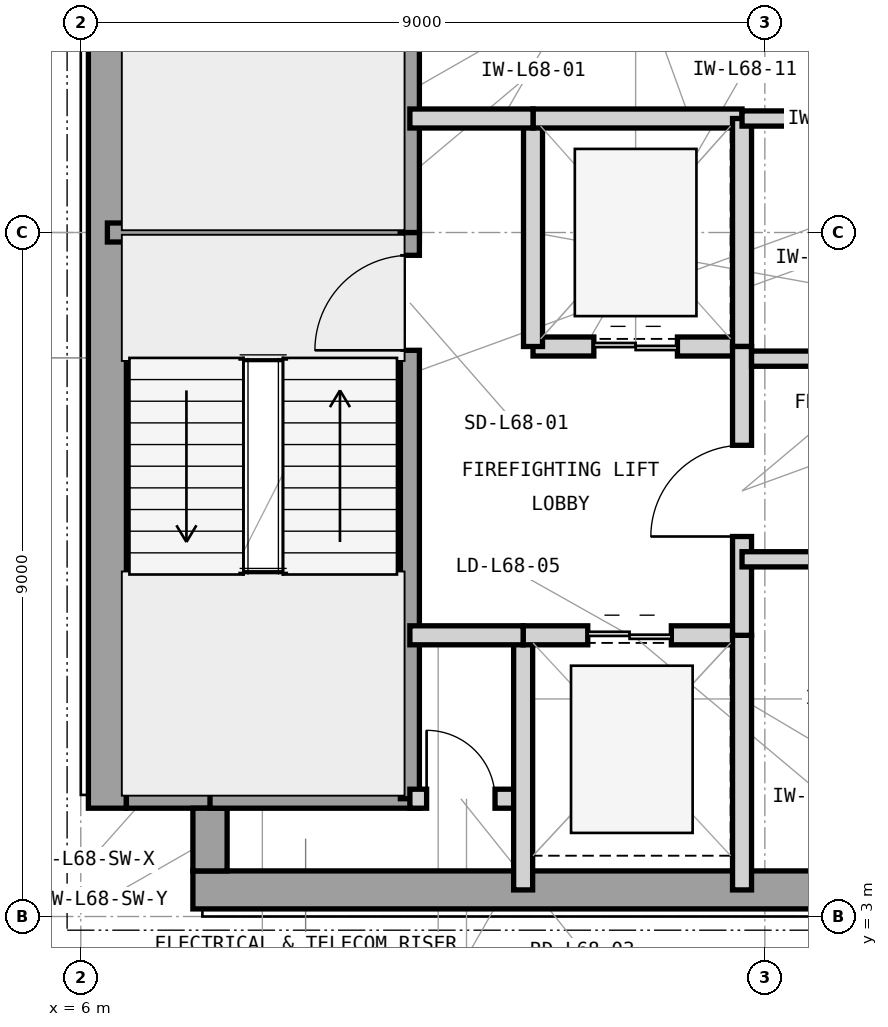
"""IFC4 building model, lengths in metres.
Left out: names, types, materials, properties, quantities, classifications, styles, units other than length and angle.
Written with IfcOpenShell. Run it as: python <this file> out.ifc"""

import sys

from ifc_helpers import new_model, si_unit, direction, frame, frame_2d, origin, place, context, subcontext, project, spatial, rectangle, extrude, element, fill, save


model = new_model("IFC4")
c1 = context("Model", 3, precision=1e-05, world=origin(), true_north=direction((0.0, 1.0)))
c2 = subcontext(c1, "Body", "Model", "MODEL_VIEW")
j1 = project(units=[si_unit("LENGTHUNIT", "METRE"), si_unit("PLANEANGLEUNIT", "RADIAN")], contexts=[c1])
p1 = place(None, origin())
s1 = spatial("IfcSite", under=j1, at=p1, CompositionType="ELEMENT")
p2 = place(p1, origin())
s2 = spatial("IfcBuilding", under=s1, at=p2, CompositionType="ELEMENT")
p3 = place(p2, frame((0.0, 0.0, 278.1)))
s3 = spatial("IfcBuildingStorey", under=s2, at=p3, CompositionType="ELEMENT", Elevation=278.1)
p4 = place(p3, frame((7.475, 3.35, 0.0), z_axis=(0.0, 0.0, 1.0), x_axis=(1.0, 0.0, 0.0)))
e1 = element("IfcWall", 1, at=p4, inside=s3, PredefinedType="SHEAR", context=c2, shape_type="SweptSolid", body=[
    extrude(rectangle(XDim=16.425, YDim=0.5, at=frame_2d((8.212, 0.0))), origin(), (0.0, 0.0, 1.0), 3.9),
])
p5 = place(p3, frame((6.35, 4.425, 0.0), z_axis=(0.0, 0.0, 1.0), x_axis=(0.0, 1.0, 0.0)))
e2 = element("IfcWall", 2, at=p5, inside=s3, PredefinedType="SHEAR", context=c2, shape_type="SweptSolid", body=[
    extrude(rectangle(XDim=15.15, YDim=0.5, at=frame_2d((7.575, 0.0))), origin(), (0.0, 0.0, 1.0), 3.9),
])
p6 = place(p3, frame((6.6, 4.65, 0.0), z_axis=(0.0, 0.0, 1.0), x_axis=(1.0, 0.0, 0.0)))
e3 = element("IfcWall", 3, at=p6, inside=s3, PredefinedType="SHEAR", context=c2, shape_type="SweptSolid", body=[
    extrude(rectangle(XDim=1.325, YDim=0.45, at=frame_2d((0.663, 0.0))), origin(), (0.0, 0.0, 1.0), 3.9),
])
p7 = place(p3, frame((7.7, 3.6, 0.0), z_axis=(0.0, 0.0, 1.0), x_axis=(0.0, 1.0, 0.0)))
e4 = element("IfcWall", 4, at=p7, inside=s3, PredefinedType="SHEAR", context=c2, shape_type="SweptSolid", body=[
    extrude(rectangle(XDim=0.825, YDim=0.45, at=frame_2d((0.413, 0.0))), origin(), (0.0, 0.0, 1.0), 3.9),
])
p8 = place(p3, frame((6.35, 12.0, 0.0), z_axis=(0.0, 0.0, 1.0), x_axis=(1.0, 0.0, 0.0)))
e5 = element("IfcWall", 5, at=p8, inside=s3, PredefinedType="SHEAR", context=c2, shape_type="SweptSolid", body=[
    extrude(rectangle(XDim=4.105, YDim=0.25, at=frame_2d((2.052, 0.0))), origin(), (0.0, 0.0, 1.0), 3.9),
])
p9 = place(p3, frame((7.7, 4.55, 0.0), z_axis=(0.0, 0.0, 1.0), x_axis=(1.0, 0.0, 0.0)))
e6 = element("IfcWall", 6, at=p9, inside=s3, PredefinedType="SHEAR", context=c2, shape_type="SweptSolid", body=[
    extrude(rectangle(XDim=2.755, YDim=0.25, at=frame_2d((1.377, 0.0))), origin(), (0.0, 0.0, 1.0), 3.9),
])
p10 = place(p3, frame((10.33, 4.55, 0.0), z_axis=(0.0, 0.0, 1.0), x_axis=(0.0, 1.0, 0.0)))
e7 = element("IfcWall", 7, at=p10, inside=s3, PredefinedType="SHEAR", context=c2, shape_type="SweptSolid", body=[
    extrude(rectangle(XDim=7.45, YDim=0.25, at=frame_2d((3.725, 0.0))), origin(), (0.0, 0.0, 1.0), 3.9),
])
p11 = place(p10, frame((5.9, 0.0, 0.0)))
e8 = element("IfcOpeningElement", 8, at=p11, cuts=e7, PredefinedType="OPENING", context=c2, shape_type="SweptSolid", body=[
    extrude(rectangle(XDim=1.25, YDim=2.2, at=frame_2d((0.625, 1.1))), frame((0.0, 0.135, 0.0), z_axis=(0.0, -1.0, 0.0), x_axis=(1.0, 0.0, 0.0)), (0.0, 0.0, 1.0), 0.27),
])
p12 = place(p3, frame((10.33, 12.0, 0.0), z_axis=(0.0, 0.0, 1.0), x_axis=(0.0, 1.0, 0.0)))
e9 = element("IfcWall", 9, at=p12, inside=s3, PredefinedType="SHEAR", context=c2, shape_type="SweptSolid", body=[
    extrude(rectangle(XDim=7.45, YDim=0.25, at=frame_2d((3.725, 0.0))), origin(), (0.0, 0.0, 1.0), 3.9),
])
p13 = place(p12, frame((5.85, 0.0, 0.0)))
e10 = element("IfcOpeningElement", 10, at=p13, cuts=e9, PredefinedType="OPENING", context=c2, shape_type="SweptSolid", body=[
    extrude(rectangle(XDim=1.25, YDim=2.2, at=frame_2d((0.625, 1.1))), frame((0.0, 0.135, 0.0), z_axis=(0.0, -1.0, 0.0), x_axis=(1.0, 0.0, 0.0)), (0.0, 0.0, 1.0), 0.27),
])
p14 = place(p3, frame((10.33, 4.55, 0.0), z_axis=(0.0, 0.0, 1.0), x_axis=(1.0, 0.0, 0.0)))
e11 = element("IfcWall", 11, at=p14, inside=s3, PredefinedType="PARTITIONING", context=c2, shape_type="SweptSolid", body=[
    extrude(rectangle(XDim=1.49, YDim=0.25, at=frame_2d((0.745, 0.0))), origin(), (0.0, 0.0, 1.0), 3.705),
])
p15 = place(p14, frame((0.22, 0.0, 0.0)))
e12 = element("IfcOpeningElement", 12, at=p15, cuts=e11, PredefinedType="OPENING", context=c2, shape_type="SweptSolid", body=[
    extrude(rectangle(XDim=0.9, YDim=2.1, at=frame_2d((0.45, 1.05))), frame((0.0, 0.135, 0.0), z_axis=(0.0, -1.0, 0.0), x_axis=(1.0, 0.0, 0.0)), (0.0, 0.0, 1.0), 0.27),
])
p16 = place(p3, frame((11.82, 3.35, 0.0), z_axis=(0.0, 0.0, 1.0), x_axis=(0.0, 1.0, 0.0)))
e13 = element("IfcWall", 13, at=p16, inside=s3, PredefinedType="PARTITIONING", context=c2, shape_type="SweptSolid", body=[
    extrude(rectangle(XDim=3.35, YDim=0.25, at=frame_2d((1.675, 0.0))), origin(), (0.0, 0.0, 1.0), 3.705),
])
p17 = place(p3, frame((11.82, 6.7, 0.0), z_axis=(0.0, 0.0, 1.0), x_axis=(1.0, 0.0, 0.0)))
e14 = element("IfcWall", 14, at=p17, inside=s3, PredefinedType="PARTITIONING", context=c2, shape_type="SweptSolid", body=[
    extrude(rectangle(XDim=2.88, YDim=0.25, at=frame_2d((1.44, 0.0))), origin(), (0.0, 0.0, 1.0), 3.088),
])
p18 = place(p17, frame((0.85, 0.0, 0.0)))
e15 = element("IfcOpeningElement", 15, at=p18, cuts=e14, PredefinedType="OPENING", context=c2, shape_type="SweptSolid", body=[
    extrude(rectangle(XDim=1.1, YDim=2.25, at=frame_2d((0.55, 1.125))), frame((0.0, 0.135, 0.0), z_axis=(0.0, -1.0, 0.0), x_axis=(1.0, 0.0, 0.0)), (0.0, 0.0, 1.0), 0.27),
])
p19 = place(p3, frame((14.7, 3.35, 0.0), z_axis=(0.0, 0.0, 1.0), x_axis=(0.0, 1.0, 0.0)))
e16 = element("IfcWall", 16, at=p19, inside=s3, PredefinedType="PARTITIONING", context=c2, shape_type="SweptSolid", body=[
    extrude(rectangle(XDim=3.35, YDim=0.25, at=frame_2d((1.675, 0.0))), origin(), (0.0, 0.0, 1.0), 3.705),
])
p20 = place(p3, frame((11.95, 10.5, 0.0), z_axis=(0.0, 0.0, 1.0), x_axis=(1.0, 0.0, 0.0)))
e17 = element("IfcWall", 17, at=p20, inside=s3, PredefinedType="PARTITIONING", context=c2, shape_type="SweptSolid", body=[
    extrude(rectangle(XDim=2.75, YDim=0.25, at=frame_2d((1.375, 0.0))), origin(), (0.0, 0.0, 1.0), 3.088),
])
p21 = place(p20, frame((0.8, 0.0, 0.0)))
e18 = element("IfcOpeningElement", 18, at=p21, cuts=e17, PredefinedType="OPENING", context=c2, shape_type="SweptSolid", body=[
    extrude(rectangle(XDim=1.1, YDim=2.25, at=frame_2d((0.55, 1.125))), frame((0.0, 0.135, 0.0), z_axis=(0.0, -1.0, 0.0), x_axis=(1.0, 0.0, 0.0)), (0.0, 0.0, 1.0), 0.27),
])
p22 = place(p3, frame((11.95, 10.5, 0.0), z_axis=(0.0, 0.0, 1.0), x_axis=(0.0, 1.0, 0.0)))
e19 = element("IfcWall", 19, at=p22, inside=s3, PredefinedType="PARTITIONING", context=c2, shape_type="SweptSolid", body=[
    extrude(rectangle(XDim=3.0, YDim=0.25, at=frame_2d((1.5, 0.0))), origin(), (0.0, 0.0, 1.0), 3.705),
])
p23 = place(p3, frame((11.95, 13.5, 0.0), z_axis=(0.0, 0.0, 1.0), x_axis=(1.0, 0.0, 0.0)))
e20 = element("IfcWall", 20, at=p23, inside=s3, PredefinedType="PARTITIONING", context=c2, shape_type="SweptSolid", body=[
    extrude(rectangle(XDim=2.75, YDim=0.25, at=frame_2d((1.375, 0.0))), origin(), (0.0, 0.0, 1.0), 3.088),
])
p24 = place(p3, frame((14.7, 10.5, 0.0), z_axis=(0.0, 0.0, 1.0), x_axis=(0.0, 1.0, 0.0)))
e21 = element("IfcWall", 21, at=p24, inside=s3, PredefinedType="PARTITIONING", context=c2, shape_type="SweptSolid", body=[
    extrude(rectangle(XDim=3.0, YDim=0.25, at=frame_2d((1.5, 0.0))), origin(), (0.0, 0.0, 1.0), 3.705),
])
p25 = place(p3, frame((14.7, 6.7, 0.0), z_axis=(0.0, 0.0, 1.0), x_axis=(0.0, 1.0, 0.0)))
e22 = element("IfcWall", 22, at=p25, inside=s3, PredefinedType="PARTITIONING", context=c2, shape_type="SweptSolid", body=[
    extrude(rectangle(XDim=3.8, YDim=0.25, at=frame_2d((1.9, 0.0))), origin(), (0.0, 0.0, 1.0), 3.705),
])
p26 = place(p25, frame((1.3, 0.0, 0.0)))
e23 = element("IfcOpeningElement", 23, at=p26, cuts=e22, PredefinedType="OPENING", context=c2, shape_type="SweptSolid", body=[
    extrude(rectangle(XDim=1.2, YDim=2.2, at=frame_2d((0.6, 1.1))), frame((0.0, 0.135, 0.0), z_axis=(0.0, -1.0, 0.0), x_axis=(1.0, 0.0, 0.0)), (0.0, 0.0, 1.0), 0.27),
])
p27 = place(p3, frame((10.33, 13.5, 0.0), z_axis=(0.0, 0.0, 1.0), x_axis=(1.0, 0.0, 0.0)))
e24 = element("IfcWall", 24, at=p27, inside=s3, PredefinedType="PARTITIONING", context=c2, shape_type="SweptSolid", body=[
    extrude(rectangle(XDim=1.62, YDim=0.25, at=frame_2d((0.81, 0.0))), origin(), (0.0, 0.0, 1.0), 3.088),
])
p28 = place(p3, frame((10.33, 6.7, 0.0), z_axis=(0.0, 0.0, 1.0), x_axis=(1.0, 0.0, 0.0)))
e25 = element("IfcWall", 25, at=p28, inside=s3, PredefinedType="PARTITIONING", context=c2, shape_type="SweptSolid", body=[
    extrude(rectangle(XDim=1.49, YDim=0.25, at=frame_2d((0.745, 0.0))), origin(), (0.0, 0.0, 1.0), 3.088),
])
p29 = place(p3, frame((14.7, 7.7, 0.0), z_axis=(0.0, 0.0, 1.0), x_axis=(1.0, 0.0, 0.0)))
e26 = element("IfcWall", 26, at=p29, inside=s3, PredefinedType="PARTITIONING", context=c2, shape_type="SweptSolid", body=[
    extrude(rectangle(XDim=5.0, YDim=0.2, at=frame_2d((2.5, 0.0))), origin(), (0.0, 0.0, 1.0), 3.705),
])
p30 = place(p29, frame((2.025, 0.0, 0.0)))
e27 = element("IfcOpeningElement", 27, at=p30, cuts=e26, PredefinedType="OPENING", context=c2, shape_type="SweptSolid", body=[
    extrude(rectangle(XDim=0.95, YDim=2.1, at=frame_2d((0.475, 1.05))), frame((0.0, 0.11, 0.0), z_axis=(0.0, -1.0, 0.0), x_axis=(1.0, 0.0, 0.0)), (0.0, 0.0, 1.0), 0.22),
])
p31 = place(p3, frame((14.825, 10.34, 0.0), z_axis=(0.0, 0.0, 1.0), x_axis=(1.0, 0.0, 0.0)))
e28 = element("IfcWall", 28, at=p31, inside=s3, PredefinedType="PARTITIONING", context=c2, shape_type="SweptSolid", body=[
    extrude(rectangle(XDim=4.88, YDim=0.2, at=frame_2d((2.44, 0.0))), origin(), (0.0, 0.0, 1.0), 3.088),
])
p32 = place(p3, frame((14.7, 13.5, 0.0), z_axis=(0.0, 0.0, 1.0), x_axis=(1.0, 0.0, 0.0)))
e29 = element("IfcWall", 29, at=p32, inside=s3, PredefinedType="PARTITIONING", context=c2, shape_type="SweptSolid", body=[
    extrude(rectangle(XDim=5.15, YDim=0.2, at=frame_2d((2.575, 0.0))), origin(), (0.0, 0.0, 1.0), 3.088),
])
p33 = place(p32, frame((2.1, 0.0, 0.0)))
e30 = element("IfcOpeningElement", 30, at=p33, cuts=e29, PredefinedType="OPENING", context=c2, shape_type="SweptSolid", body=[
    extrude(rectangle(XDim=0.95, YDim=2.1, at=frame_2d((0.475, 1.05))), frame((0.0, 0.11, 0.0), z_axis=(0.0, -1.0, 0.0), x_axis=(1.0, 0.0, 0.0)), (0.0, 0.0, 1.0), 0.22),
])
p34 = place(p11, origin())
e31 = element("IfcDoor", 31, at=p34, inside=s3, OperationType="SINGLE_SWING_LEFT", PredefinedType="DOOR", context=c2, shape_type="SweptSolid", body=[
    extrude(rectangle(XDim=1.25, YDim=2.2, at=frame_2d((0.625, 1.1))), frame((0.0, 0.025, 0.0), z_axis=(0.0, -1.0, 0.0), x_axis=(1.0, 0.0, 0.0)), (0.0, 0.0, 1.0), 0.05),
])
fill(e8, e31)
p35 = place(p15, origin())
e32 = element("IfcDoor", 32, at=p35, inside=s3, OperationType="SINGLE_SWING_LEFT", PredefinedType="TRAPDOOR", context=c2, shape_type="SweptSolid", body=[
    extrude(rectangle(XDim=0.9, YDim=2.1, at=frame_2d((0.45, 1.05))), frame((0.0, 0.025, 0.0), z_axis=(0.0, -1.0, 0.0), x_axis=(1.0, 0.0, 0.0)), (0.0, 0.0, 1.0), 0.05),
])
fill(e12, e32)
p36 = place(p18, origin())
e33 = element("IfcDoor", 33, at=p36, inside=s3, OperationType="DOUBLE_DOOR_SLIDING", PredefinedType="DOOR", context=c2, shape_type="SweptSolid", body=[
    extrude(rectangle(XDim=1.1, YDim=2.25, at=frame_2d((0.55, 1.125))), frame((0.0, 0.025, 0.0), z_axis=(0.0, -1.0, 0.0), x_axis=(1.0, 0.0, 0.0)), (0.0, 0.0, 1.0), 0.05),
])
fill(e15, e33)
p37 = place(p21, origin())
e34 = element("IfcDoor", 34, at=p37, inside=s3, OperationType="DOUBLE_DOOR_SLIDING", PredefinedType="DOOR", context=c2, shape_type="SweptSolid", body=[
    extrude(rectangle(XDim=1.1, YDim=2.25, at=frame_2d((0.55, 1.125))), frame((0.0, 0.025, 0.0), z_axis=(0.0, -1.0, 0.0), x_axis=(1.0, 0.0, 0.0)), (0.0, 0.0, 1.0), 0.05),
])
fill(e18, e34)
p38 = place(p26, origin())
e35 = element("IfcDoor", 35, at=p38, inside=s3, OperationType="SINGLE_SWING_LEFT", PredefinedType="DOOR", context=c2, shape_type="SweptSolid", body=[
    extrude(rectangle(XDim=1.2, YDim=2.2, at=frame_2d((0.6, 1.1))), frame((0.0, 0.025, 0.0), z_axis=(0.0, -1.0, 0.0), x_axis=(1.0, 0.0, 0.0)), (0.0, 0.0, 1.0), 0.05),
])
fill(e23, e35)
save(model, sys.argv[1])
